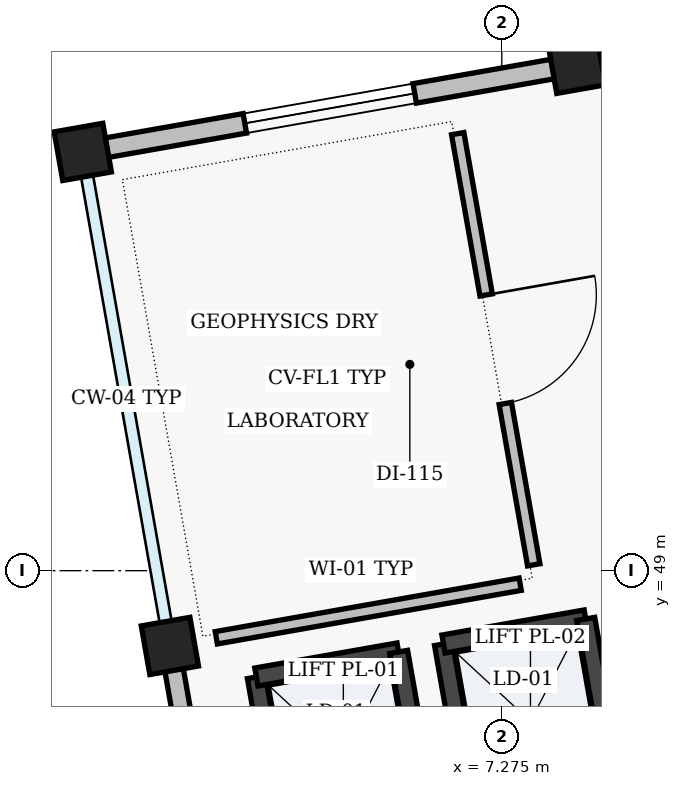
"""IFC4 building model, lengths in metres.
Left out: names, types, materials, properties, quantities, classifications, styles, units other than length and angle.
Written with IfcOpenShell. Run it as: python <this file> out.ifc"""

import sys

from ifc_helpers import new_model, si_unit, direction, frame, frame_2d, origin, origin_2d, place, context, subcontext, project, spatial, rectangle, extrude, element, fill, save


model = new_model("IFC4")
c1 = context("Model", 3, precision=1e-05, world=origin(), true_north=direction((0.0, 1.0)))
c2 = subcontext(c1, "Body", "Model", "MODEL_VIEW")
j1 = project(units=[si_unit("LENGTHUNIT", "METRE"), si_unit("PLANEANGLEUNIT", "RADIAN")], contexts=[c1])
p1 = place(None, origin())
s1 = spatial("IfcSite", under=j1, at=p1, CompositionType="ELEMENT")
p2 = place(p1, origin())
s2 = spatial("IfcBuilding", under=s1, at=p2, CompositionType="ELEMENT")
p3 = place(p2, frame((0.0, 0.0, 23.1)))
s3 = spatial("IfcBuildingStorey", under=s2, at=p3, CompositionType="ELEMENT", Elevation=23.1)
for number, where, z_axis, x_axis in (
    (1, (2.908, 48.01, 0.0), (0.0, 0.0, 1.0), (0.985, 0.174, 0.0)),
    (2, (1.762, 54.509, 0.0), (0.0, 0.0, 1.0), (0.985, 0.174, 0.0)),
    (3, (8.261, 55.655, 0.0), (0.0, 0.0, 1.0), (0.985, 0.174, 0.0)),
):
    element("IfcColumn", number, at=place(p3, frame(where, z_axis=z_axis, x_axis=x_axis)), inside=s3, PredefinedType="COLUMN", context=c2, shape_type="SweptSolid", body=[
        extrude(rectangle(XDim=0.65, YDim=0.65, at=origin_2d()), origin(), (0.0, 0.0, 1.0), 4.31),
    ])
p4 = place(p3, frame((3.998, 41.825, 0.0), z_axis=(0.0, 0.0, 1.0), x_axis=(-0.173645120828, 0.98480829201, 0.0)))
e4 = element("IfcWall", 4, at=p4, inside=s3, PredefinedType="STANDARD", context=c2, shape_type="SweptSolid", body=[
    extrude(rectangle(XDim=5.96, YDim=0.245, at=frame_2d((2.98, 0.0))), origin(), (0.0, 0.0, 1.0), 3.795),
])
p5 = place(p4, frame((1.8, 0.0, 0.95)))
e5 = element("IfcOpeningElement", 5, at=p5, cuts=e4, PredefinedType="OPENING", context=c2, shape_type="SweptSolid", body=[
    extrude(rectangle(XDim=2.36, YDim=1.36, at=frame_2d((1.18, 0.68))), frame((0.0, 0.123, 0.0), z_axis=(0.0, -1.0, 0.0), x_axis=(1.0, 0.0, 0.0)), (0.0, 0.0, 1.0), 0.245),
])
p6 = place(p3, frame((2.077, 54.565, 0.0), z_axis=(0.0, 0.0, 1.0), x_axis=(0.98480829201, 0.173645120828, 0.0)))
e6 = element("IfcWall", 6, at=p6, inside=s3, PredefinedType="STANDARD", context=c2, shape_type="SweptSolid", body=[
    extrude(rectangle(XDim=5.96, YDim=0.26, at=frame_2d((2.98, 0.0))), origin(), (0.0, 0.0, 1.0), 3.795),
])
p7 = place(p6, frame((1.845, 0.0, 0.95)))
e7 = element("IfcOpeningElement", 7, at=p7, cuts=e6, PredefinedType="OPENING", context=c2, shape_type="SweptSolid", body=[
    extrude(rectangle(XDim=2.27, YDim=1.48, at=frame_2d((1.135, 0.74))), frame((0.0, 0.13, 0.0), z_axis=(0.0, -1.0, 0.0), x_axis=(1.0, 0.0, 0.0)), (0.0, 0.0, 1.0), 0.26),
])
p8 = place(p3, frame((4.463, 45.237, 0.0), z_axis=(0.0, 0.0, 1.0), x_axis=(-0.173646056486, 0.984808127031, 0.0)))
e8 = element("IfcWall", 8, at=p8, inside=s3, PredefinedType="SHEAR", context=c2, shape_type="SweptSolid", body=[
    extrude(rectangle(XDim=2.4, YDim=0.24, at=frame_2d((1.2, 0.0))), origin(), (0.0, 0.0, 1.0), 4.28),
])
p9 = place(p3, frame((4.046, 47.601, 0.0), z_axis=(0.0, 0.0, 1.0), x_axis=(0.984793905749, 0.173726691098, 0.0)))
e9 = element("IfcWall", 9, at=p9, inside=s3, PredefinedType="SHEAR", context=c2, shape_type="SweptSolid", body=[
    extrude(rectangle(XDim=1.9, YDim=0.24, at=frame_2d((0.95, 0.0))), origin(), (0.0, 0.0, 1.0), 4.28),
])
for number, where, z_axis, x_axis in (
    (10, (5.917, 47.931, 0.0), (0.0, 0.0, 1.0), (0.174, -0.985, 0.0)),
    (11, (6.925, 45.671, 0.0), (0.0, 0.0, 1.0), (-0.174, 0.985, 0.0)),
):
    element("IfcWall", number, at=place(p3, frame(where, z_axis=z_axis, x_axis=x_axis)), inside=s3, PredefinedType="SHEAR", context=c2, shape_type="SweptSolid", body=[
        extrude(rectangle(XDim=2.4, YDim=0.24, at=frame_2d((1.2, 0.0))), origin(), (0.0, 0.0, 1.0), 4.28),
    ])
p10 = place(p3, frame((6.508, 48.035, 0.0), z_axis=(0.0, 0.0, 1.0), x_axis=(0.984793905749, 0.173726691098, 0.0)))
e12 = element("IfcWall", 12, at=p10, inside=s3, PredefinedType="SHEAR", context=c2, shape_type="SweptSolid", body=[
    extrude(rectangle(XDim=1.9, YDim=0.24, at=frame_2d((0.95, 0.0))), origin(), (0.0, 0.0, 1.0), 4.28),
])
p11 = place(p3, frame((8.379, 48.365, 0.0), z_axis=(0.0, 0.0, 1.0), x_axis=(0.173646056486, -0.984808127031, 0.0)))
e13 = element("IfcWall", 13, at=p11, inside=s3, PredefinedType="SHEAR", context=c2, shape_type="SweptSolid", body=[
    extrude(rectangle(XDim=2.4, YDim=0.24, at=frame_2d((1.2, 0.0))), origin(), (0.0, 0.0, 1.0), 4.28),
])
p12 = place(p3, frame((3.518, 48.117, 0.0), z_axis=(0.0, 0.0, 1.0), x_axis=(0.984816834462, 0.173596666326, 0.0)))
e14 = element("IfcWall", 14, at=p12, inside=s3, PredefinedType="PARTITIONING", context=c2, shape_type="SweptSolid", body=[
    extrude(rectangle(XDim=4.06, YDim=0.165, at=frame_2d((2.03, 0.0))), origin(), (0.0, 0.0, 1.0), 3.695),
])
p13 = place(p3, frame((7.695, 49.077, 0.0), z_axis=(0.0, 0.0, 1.0), x_axis=(-0.173649928941, 0.984807444214, 0.0)))
e15 = element("IfcWall", 15, at=p13, inside=s3, PredefinedType="PARTITIONING", context=c2, shape_type="SweptSolid", body=[
    extrude(rectangle(XDim=5.76, YDim=0.165, at=frame_2d((2.88, 0.0))), origin(), (0.0, 0.0, 1.0), 3.95),
])
p14 = place(p13, frame((2.155, 0.0, 0.0)))
e16 = element("IfcOpeningElement", 16, at=p14, cuts=e15, PredefinedType="OPENING", context=c2, shape_type="SweptSolid", body=[
    extrude(rectangle(XDim=1.45, YDim=2.08, at=frame_2d((0.725, 1.04))), frame((0.0, 0.083, 0.0), z_axis=(0.0, -1.0, 0.0), x_axis=(1.0, 0.0, 0.0)), (0.0, 0.0, 1.0), 0.165),
])
p15 = place(p7, origin())
e17 = element("IfcWindow", 17, at=p15, inside=s3, PartitioningType="SINGLE_PANEL", PredefinedType="WINDOW", context=c2, shape_type="SweptSolid", body=[
    extrude(rectangle(XDim=2.27, YDim=1.48, at=frame_2d((1.135, 0.74))), frame((0.0, 0.03, 0.0), z_axis=(0.0, -1.0, 0.0), x_axis=(1.0, 0.0, 0.0)), (0.0, 0.0, 1.0), 0.06),
])
fill(e7, e17)
p16 = place(p14, origin())
e18 = element("IfcDoor", 18, at=p16, inside=s3, OperationType="SINGLE_SWING_RIGHT", PredefinedType="DOOR", context=c2, shape_type="SweptSolid", body=[
    extrude(rectangle(XDim=1.45, YDim=2.08, at=frame_2d((0.725, 1.04))), frame((0.0, 0.025, 0.0), z_axis=(0.0, -1.0, 0.0), x_axis=(1.0, 0.0, 0.0)), (0.0, 0.0, 1.0), 0.05),
])
fill(e16, e18)
save(model, sys.argv[1])
